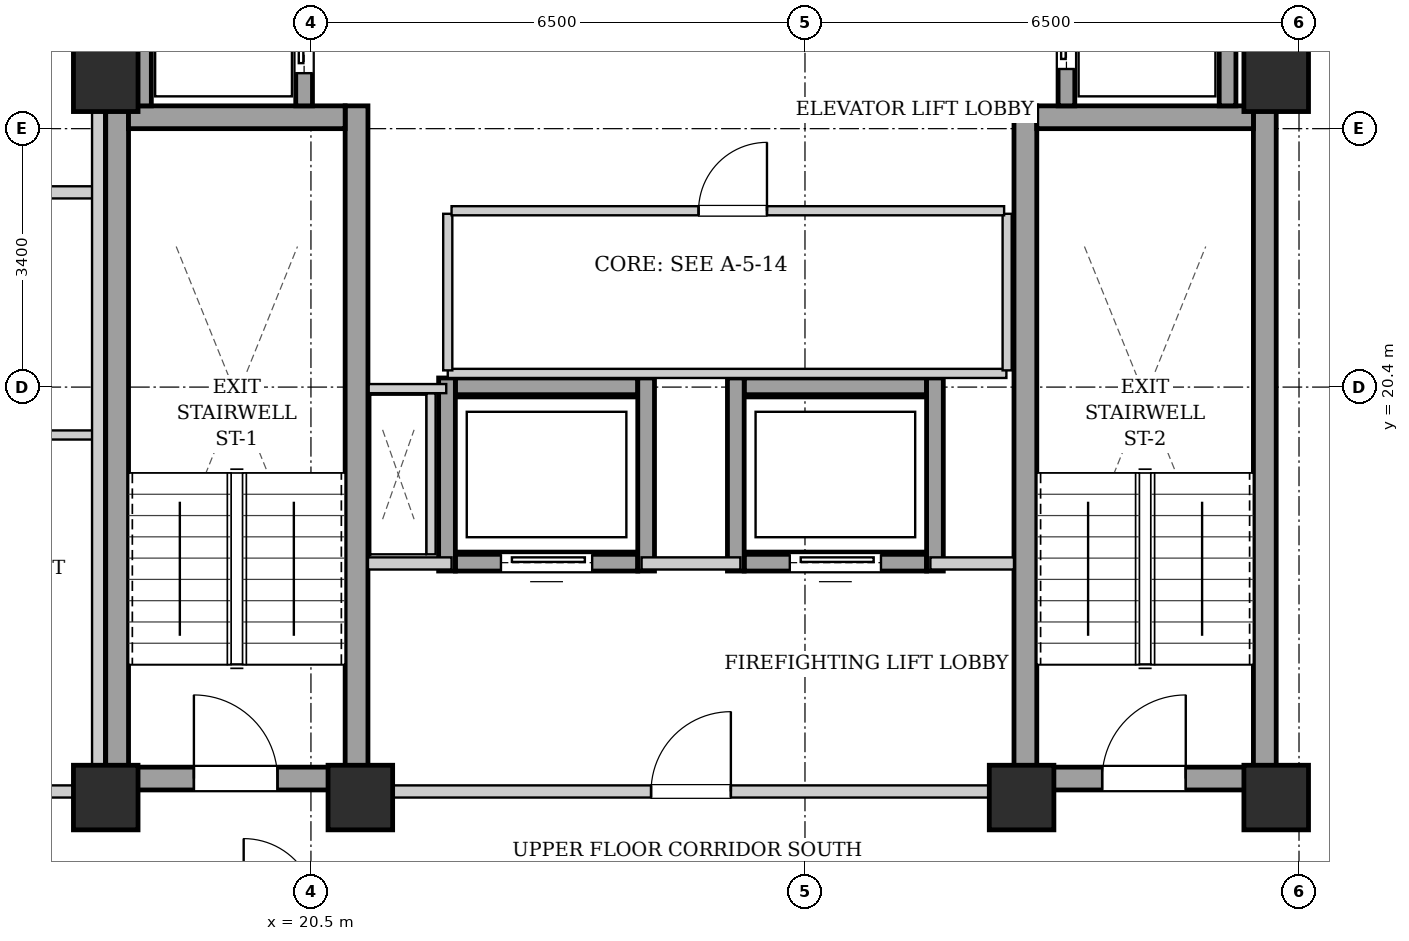
"""IFC4 building model, lengths in metres.
Left out: names, types, materials, properties, quantities, classifications, styles, units other than length and angle.
Written with IfcOpenShell. Run it as: python <this file> out.ifc"""

import sys

from ifc_helpers import new_model, si_unit, direction, frame, frame_2d, origin, origin_2d, place, context, subcontext, project, spatial, rectangle, extrude, element, fill, save


model = new_model("IFC4")
c1 = context("Model", 3, precision=1e-05, world=origin(), true_north=direction((0.0, 1.0)))
c2 = subcontext(c1, "Body", "Model", "MODEL_VIEW")
j1 = project(units=[si_unit("LENGTHUNIT", "METRE"), si_unit("PLANEANGLEUNIT", "RADIAN")], contexts=[c1])
p1 = place(None, origin())
s1 = spatial("IfcSite", under=j1, at=p1, CompositionType="ELEMENT")
p2 = place(p1, origin())
s2 = spatial("IfcBuilding", under=s1, at=p2, CompositionType="ELEMENT")
p3 = place(p2, frame((0.0, 0.0, 187.6)))
s3 = spatial("IfcBuildingStorey", under=s2, at=p3, CompositionType="ELEMENT", Elevation=187.6)
for number, where, z_axis, x_axis in (
    (1, (17.8, 15.0, 0.0), (0.0, 0.0, 1.0), (1.0, 0.0, 0.0)),
    (2, (21.15, 15.0, 0.0), (0.0, 0.0, 1.0), (1.0, 0.0, 0.0)),
    (3, (29.85, 15.0, 0.0), (0.0, 0.0, 1.0), (1.0, 0.0, 0.0)),
    (4, (33.2, 15.0, 0.0), (0.0, 0.0, 1.0), (1.0, 0.0, 0.0)),
    (5, (17.8, 24.45, 0.0), (0.0, 0.0, 1.0), (1.0, 0.0, 0.0)),
    (6, (33.2, 24.45, 0.0), (0.0, 0.0, 1.0), (1.0, 0.0, 0.0)),
):
    element("IfcColumn", number, at=place(p3, frame(where, z_axis=z_axis, x_axis=x_axis)), inside=s3, PredefinedType="COLUMN", context=c2, shape_type="SweptSolid", body=[
        extrude(rectangle(XDim=0.85, YDim=0.85, at=origin_2d()), origin(), (0.0, 0.0, 1.0), 3.3),
    ])
for number, where, z_axis, x_axis in (
    (7, (17.95, 15.1, 0.0), (0.0, 0.0, 1.0), (0.0, 1.0, 0.0)),
    (8, (21.1, 15.1, 0.0), (0.0, 0.0, 1.0), (0.0, 1.0, 0.0)),
):
    element("IfcWall", number, at=place(p3, frame(where, z_axis=z_axis, x_axis=x_axis)), inside=s3, PredefinedType="SHEAR", context=c2, shape_type="SweptSolid", body=[
        extrude(rectangle(XDim=9.0, YDim=0.3, at=frame_2d((4.5, 0.0))), origin(), (0.0, 0.0, 1.0), 3.04),
    ])
p4 = place(p3, frame((18.1, 23.95, 0.0), z_axis=(0.0, 0.0, 1.0), x_axis=(1.0, 0.0, 0.0)))
e9 = element("IfcWall", 9, at=p4, inside=s3, PredefinedType="SHEAR", context=c2, shape_type="SweptSolid", body=[
    extrude(rectangle(XDim=2.85, YDim=0.3, at=frame_2d((1.425, 0.0))), origin(), (0.0, 0.0, 1.0), 3.04),
])
p5 = place(p3, frame((18.1, 15.25, 0.0), z_axis=(0.0, 0.0, 1.0), x_axis=(1.0, 0.0, 0.0)))
e10 = element("IfcWall", 10, at=p5, inside=s3, PredefinedType="SHEAR", context=c2, shape_type="SweptSolid", body=[
    extrude(rectangle(XDim=2.85, YDim=0.3, at=frame_2d((1.425, 0.0))), origin(), (0.0, 0.0, 1.0), 3.04),
])
p6 = place(p5, frame((0.86, 0.0, 0.0)))
e11 = element("IfcOpeningElement", 11, at=p6, cuts=e10, PredefinedType="OPENING", context=c2, shape_type="SweptSolid", body=[
    extrude(rectangle(XDim=1.1, YDim=2.05, at=frame_2d((0.55, 1.025))), frame((0.0, 0.16, 0.0), z_axis=(0.0, -1.0, 0.0), x_axis=(1.0, 0.0, 0.0)), (0.0, 0.0, 1.0), 0.32),
])
for number, where, z_axis, x_axis in (
    (12, (29.9, 15.1, 0.0), (0.0, 0.0, 1.0), (0.0, 1.0, 0.0)),
    (13, (33.05, 15.1, 0.0), (0.0, 0.0, 1.0), (0.0, 1.0, 0.0)),
):
    element("IfcWall", number, at=place(p3, frame(where, z_axis=z_axis, x_axis=x_axis)), inside=s3, PredefinedType="SHEAR", context=c2, shape_type="SweptSolid", body=[
        extrude(rectangle(XDim=9.0, YDim=0.3, at=frame_2d((4.5, 0.0))), origin(), (0.0, 0.0, 1.0), 3.04),
    ])
p7 = place(p3, frame((30.05, 23.95, 0.0), z_axis=(0.0, 0.0, 1.0), x_axis=(1.0, 0.0, 0.0)))
e14 = element("IfcWall", 14, at=p7, inside=s3, PredefinedType="SHEAR", context=c2, shape_type="SweptSolid", body=[
    extrude(rectangle(XDim=2.85, YDim=0.3, at=frame_2d((1.425, 0.0))), origin(), (0.0, 0.0, 1.0), 3.04),
])
p8 = place(p3, frame((30.05, 15.25, 0.0), z_axis=(0.0, 0.0, 1.0), x_axis=(1.0, 0.0, 0.0)))
e15 = element("IfcWall", 15, at=p8, inside=s3, PredefinedType="SHEAR", context=c2, shape_type="SweptSolid", body=[
    extrude(rectangle(XDim=2.85, YDim=0.3, at=frame_2d((1.425, 0.0))), origin(), (0.0, 0.0, 1.0), 3.04),
])
p9 = place(p8, frame((0.86, 0.0, 0.0)))
e16 = element("IfcOpeningElement", 16, at=p9, cuts=e15, PredefinedType="OPENING", context=c2, shape_type="SweptSolid", body=[
    extrude(rectangle(XDim=1.1, YDim=2.05, at=frame_2d((0.55, 1.025))), frame((0.0, 0.16, 0.0), z_axis=(0.0, -1.0, 0.0), x_axis=(1.0, 0.0, 0.0)), (0.0, 0.0, 1.0), 0.32),
])
p10 = place(p3, frame((18.29, 24.1, 0.0), z_axis=(0.0, 0.0, 1.0), x_axis=(0.0, 1.0, 0.0)))
e17 = element("IfcWall", 17, at=p10, inside=s3, PredefinedType="SHEAR", context=c2, shape_type="SweptSolid", body=[
    extrude(rectangle(XDim=4.14, YDim=0.22, at=frame_2d((2.07, 0.0))), origin(), (0.0, 0.0, 1.0), 3.04),
])
p11 = place(p3, frame((20.41, 24.1, 0.0), z_axis=(0.0, 0.0, 1.0), x_axis=(0.0, 1.0, 0.0)))
e18 = element("IfcWall", 18, at=p11, inside=s3, PredefinedType="SHEAR", context=c2, shape_type="SweptSolid", body=[
    extrude(rectangle(XDim=1.96, YDim=0.22, at=frame_2d((0.98, 0.0))), origin(), (0.0, 0.0, 1.0), 3.04),
])
p12 = place(p11, frame((0.43, 0.0, 0.0)))
e19 = element("IfcOpeningElement", 19, at=p12, cuts=e18, PredefinedType="OPENING", context=c2, shape_type="SweptSolid", body=[
    extrude(rectangle(XDim=1.1, YDim=2.15, at=frame_2d((0.55, 1.075))), frame((0.0, 0.12, 0.0), z_axis=(0.0, -1.0, 0.0), x_axis=(1.0, 0.0, 0.0)), (0.0, 0.0, 1.0), 0.24),
])
p13 = place(p3, frame((30.44, 24.1, 0.0), z_axis=(0.0, 0.0, 1.0), x_axis=(0.0, 1.0, 0.0)))
e20 = element("IfcWall", 20, at=p13, inside=s3, PredefinedType="SHEAR", context=c2, shape_type="SweptSolid", body=[
    extrude(rectangle(XDim=2.07, YDim=0.22, at=frame_2d((1.035, 0.0))), origin(), (0.0, 0.0, 1.0), 3.04),
])
p14 = place(p13, frame((0.485, 0.0, 0.0)))
e21 = element("IfcOpeningElement", 21, at=p14, cuts=e20, PredefinedType="OPENING", context=c2, shape_type="SweptSolid", body=[
    extrude(rectangle(XDim=1.1, YDim=2.15, at=frame_2d((0.55, 1.075))), frame((0.0, 0.12, 0.0), z_axis=(0.0, -1.0, 0.0), x_axis=(1.0, 0.0, 0.0)), (0.0, 0.0, 1.0), 0.24),
])
p15 = place(p3, frame((32.56, 24.1, 0.0), z_axis=(0.0, 0.0, 1.0), x_axis=(0.0, 1.0, 0.0)))
e22 = element("IfcWall", 22, at=p15, inside=s3, PredefinedType="SHEAR", context=c2, shape_type="SweptSolid", body=[
    extrude(rectangle(XDim=2.07, YDim=0.22, at=frame_2d((1.035, 0.0))), origin(), (0.0, 0.0, 1.0), 3.04),
])
p16 = place(p3, frame((22.4, 18.09, 0.0), z_axis=(0.0, 0.0, 1.0), x_axis=(1.0, 0.0, 0.0)))
e23 = element("IfcWall", 23, at=p16, inside=s3, PredefinedType="SHEAR", context=c2, shape_type="SweptSolid", body=[
    extrude(rectangle(XDim=2.4, YDim=0.22, at=frame_2d((1.2, 0.0))), origin(), (0.0, 0.0, 1.0), 3.04),
])
p17 = place(p16, frame((0.6, 0.0, 0.0)))
e24 = element("IfcOpeningElement", 24, at=p17, cuts=e23, PredefinedType="OPENING", context=c2, shape_type="SweptSolid", body=[
    extrude(rectangle(XDim=1.2, YDim=2.15, at=frame_2d((0.6, 1.075))), frame((0.0, 0.12, 0.0), z_axis=(0.0, -1.0, 0.0), x_axis=(1.0, 0.0, 0.0)), (0.0, 0.0, 1.0), 0.24),
])
p18 = place(p3, frame((22.4, 20.41, 0.0), z_axis=(0.0, 0.0, 1.0), x_axis=(1.0, 0.0, 0.0)))
e25 = element("IfcWall", 25, at=p18, inside=s3, PredefinedType="SHEAR", context=c2, shape_type="SweptSolid", body=[
    extrude(rectangle(XDim=2.4, YDim=0.22, at=frame_2d((1.2, 0.0))), origin(), (0.0, 0.0, 1.0), 3.04),
])
for number, where, z_axis, x_axis in (
    (26, (22.29, 17.98, 0.0), (0.0, 0.0, 1.0), (0.0, 1.0, 0.0)),
    (27, (24.91, 17.98, 0.0), (0.0, 0.0, 1.0), (0.0, 1.0, 0.0)),
):
    element("IfcWall", number, at=place(p3, frame(where, z_axis=z_axis, x_axis=x_axis)), inside=s3, PredefinedType="SHEAR", context=c2, shape_type="SweptSolid", body=[
        extrude(rectangle(XDim=2.54, YDim=0.22, at=frame_2d((1.27, 0.0))), origin(), (0.0, 0.0, 1.0), 3.04),
    ])
p19 = place(p3, frame((26.2, 18.09, 0.0), z_axis=(0.0, 0.0, 1.0), x_axis=(1.0, 0.0, 0.0)))
e28 = element("IfcWall", 28, at=p19, inside=s3, PredefinedType="SHEAR", context=c2, shape_type="SweptSolid", body=[
    extrude(rectangle(XDim=2.4, YDim=0.22, at=frame_2d((1.2, 0.0))), origin(), (0.0, 0.0, 1.0), 3.04),
])
p20 = place(p19, frame((0.6, 0.0, 0.0)))
e29 = element("IfcOpeningElement", 29, at=p20, cuts=e28, PredefinedType="OPENING", context=c2, shape_type="SweptSolid", body=[
    extrude(rectangle(XDim=1.2, YDim=2.15, at=frame_2d((0.6, 1.075))), frame((0.0, 0.12, 0.0), z_axis=(0.0, -1.0, 0.0), x_axis=(1.0, 0.0, 0.0)), (0.0, 0.0, 1.0), 0.24),
])
p21 = place(p3, frame((26.2, 20.41, 0.0), z_axis=(0.0, 0.0, 1.0), x_axis=(1.0, 0.0, 0.0)))
e30 = element("IfcWall", 30, at=p21, inside=s3, PredefinedType="SHEAR", context=c2, shape_type="SweptSolid", body=[
    extrude(rectangle(XDim=2.4, YDim=0.22, at=frame_2d((1.2, 0.0))), origin(), (0.0, 0.0, 1.0), 3.04),
])
for number, where, z_axis, x_axis in (
    (31, (26.09, 17.98, 0.0), (0.0, 0.0, 1.0), (0.0, 1.0, 0.0)),
    (32, (28.71, 17.98, 0.0), (0.0, 0.0, 1.0), (0.0, 1.0, 0.0)),
):
    element("IfcWall", number, at=place(p3, frame(where, z_axis=z_axis, x_axis=x_axis)), inside=s3, PredefinedType="SHEAR", context=c2, shape_type="SweptSolid", body=[
        extrude(rectangle(XDim=2.54, YDim=0.22, at=frame_2d((1.27, 0.0))), origin(), (0.0, 0.0, 1.0), 3.04),
    ])
p22 = place(p3, frame((21.25, 15.08, 0.0), z_axis=(0.0, 0.0, 1.0), x_axis=(1.0, 0.0, 0.0)))
e33 = element("IfcWall", 33, at=p22, inside=s3, PredefinedType="PARTITIONING", context=c2, shape_type="SweptSolid", body=[
    extrude(rectangle(XDim=8.5, YDim=0.16, at=frame_2d((4.25, 0.0))), origin(), (0.0, 0.0, 1.0), 2.556),
])
p23 = place(p22, frame((3.725, 0.0, 0.0)))
e34 = element("IfcOpeningElement", 34, at=p23, cuts=e33, PredefinedType="OPENING", context=c2, shape_type="SweptSolid", body=[
    extrude(rectangle(XDim=1.05, YDim=2.05, at=frame_2d((0.525, 1.025))), frame((0.0, 0.09, 0.0), z_axis=(0.0, -1.0, 0.0), x_axis=(1.0, 0.0, 0.0)), (0.0, 0.0, 1.0), 0.18),
])
p24 = place(p3, frame((21.25, 18.08, 0.0), z_axis=(0.0, 0.0, 1.0), x_axis=(1.0, 0.0, 0.0)))
e35 = element("IfcWall", 35, at=p24, inside=s3, PredefinedType="PARTITIONING", context=c2, shape_type="SweptSolid", body=[
    extrude(rectangle(XDim=1.1, YDim=0.16, at=frame_2d((0.55, 0.0))), origin(), (0.0, 0.0, 1.0), 3.04),
])
p25 = place(p3, frame((24.85, 18.08, 0.0), z_axis=(0.0, 0.0, 1.0), x_axis=(1.0, 0.0, 0.0)))
e36 = element("IfcWall", 36, at=p25, inside=s3, PredefinedType="PARTITIONING", context=c2, shape_type="SweptSolid", body=[
    extrude(rectangle(XDim=1.3, YDim=0.16, at=frame_2d((0.65, 0.0))), origin(), (0.0, 0.0, 1.0), 3.04),
])
p26 = place(p3, frame((28.65, 18.08, 0.0), z_axis=(0.0, 0.0, 1.0), x_axis=(1.0, 0.0, 0.0)))
e37 = element("IfcWall", 37, at=p26, inside=s3, PredefinedType="PARTITIONING", context=c2, shape_type="SweptSolid", body=[
    extrude(rectangle(XDim=1.1, YDim=0.16, at=frame_2d((0.55, 0.0))), origin(), (0.0, 0.0, 1.0), 3.04),
])
for number, where, z_axis, x_axis in (
    (38, (17.88, 24.12, 0.0), (0.0, 0.0, 1.0), (0.0, 1.0, 0.0)),
    (39, (33.12, 24.12, 0.0), (0.0, 0.0, 1.0), (0.0, 1.0, 0.0)),
):
    element("IfcWall", number, at=place(p3, frame(where, z_axis=z_axis, x_axis=x_axis)), inside=s3, PredefinedType="PARTITIONING", context=c2, shape_type="SweptSolid", body=[
        extrude(rectangle(XDim=4.76, YDim=0.16, at=frame_2d((2.38, 0.0))), origin(), (0.0, 0.0, 1.0), 2.375),
    ])
p27 = place(p3, frame((22.08, 18.2, 0.0), z_axis=(0.0, 0.0, 1.0), x_axis=(0.0, 1.0, 0.0)))
e40 = element("IfcWall", 40, at=p27, inside=s3, PredefinedType="PARTITIONING", context=c2, shape_type="SweptSolid", body=[
    extrude(rectangle(XDim=2.12, YDim=0.12, at=frame_2d((1.06, 0.0))), origin(), (0.0, 0.0, 1.0), 3.04),
])
p28 = place(p3, frame((22.28, 20.38, 0.0), z_axis=(0.0, 0.0, 1.0), x_axis=(-1.0, 0.0, 0.0)))
e41 = element("IfcWall", 41, at=p28, inside=s3, PredefinedType="PARTITIONING", context=c2, shape_type="SweptSolid", body=[
    extrude(rectangle(XDim=1.02, YDim=0.12, at=frame_2d((0.51, 0.0))), origin(), (0.0, 0.0, 1.0), 3.04),
])
p29 = place(p3, frame((22.3, 20.58, 0.0), z_axis=(0.0, 0.0, 1.0), x_axis=(1.0, 0.0, 0.0)))
e42 = element("IfcWall", 42, at=p29, inside=s3, PredefinedType="PARTITIONING", context=c2, shape_type="SweptSolid", body=[
    extrude(rectangle(XDim=7.35, YDim=0.12, at=frame_2d((3.675, 0.0))), origin(), (0.0, 0.0, 1.0), 3.04),
])
for number, where, z_axis, x_axis in (
    (43, (22.3, 20.62, 0.0), (0.0, 0.0, 1.0), (0.0, 1.0, 0.0)),
    (44, (29.66, 20.62, 0.0), (0.0, 0.0, 1.0), (0.0, 1.0, 0.0)),
):
    element("IfcWall", number, at=place(p3, frame(where, z_axis=z_axis, x_axis=x_axis)), inside=s3, PredefinedType="PARTITIONING", context=c2, shape_type="SweptSolid", body=[
        extrude(rectangle(XDim=2.06, YDim=0.12, at=frame_2d((1.03, 0.0))), origin(), (0.0, 0.0, 1.0), 3.04),
    ])
p30 = place(p3, frame((22.35, 22.72, 0.0), z_axis=(0.0, 0.0, 1.0), x_axis=(1.0, 0.0, 0.0)))
e45 = element("IfcWall", 45, at=p30, inside=s3, PredefinedType="PARTITIONING", context=c2, shape_type="SweptSolid", body=[
    extrude(rectangle(XDim=7.27, YDim=0.12, at=frame_2d((3.635, 0.0))), origin(), (0.0, 0.0, 1.0), 3.04),
])
p31 = place(p30, frame((3.25, 0.0, 0.0)))
e46 = element("IfcOpeningElement", 46, at=p31, cuts=e45, PredefinedType="OPENING", context=c2, shape_type="SweptSolid", body=[
    extrude(rectangle(XDim=0.9, YDim=2.05, at=frame_2d((0.45, 1.025))), frame((0.0, 0.07, 0.0), z_axis=(0.0, -1.0, 0.0), x_axis=(1.0, 0.0, 0.0)), (0.0, 0.0, 1.0), 0.14),
])
p32 = place(p3, frame((10.88, 15.08, 0.0), z_axis=(0.0, 0.0, 1.0), x_axis=(1.0, 0.0, 0.0)))
e47 = element("IfcWall", 47, at=p32, inside=s3, PredefinedType="PARTITIONING", context=c2, shape_type="SweptSolid", body=[
    extrude(rectangle(XDim=6.88, YDim=0.16, at=frame_2d((3.44, 0.0))), origin(), (0.0, 0.0, 1.0), 2.556),
])
p33 = place(p32, frame((5.06, 0.0, 0.0)))
e48 = element("IfcOpeningElement", 48, at=p33, cuts=e47, PredefinedType="OPENING", context=c2, shape_type="SweptSolid", body=[
    extrude(rectangle(XDim=0.95, YDim=2.1, at=frame_2d((0.475, 1.05))), frame((0.0, 0.09, 0.0), z_axis=(0.0, -1.0, 0.0), x_axis=(1.0, 0.0, 0.0)), (0.0, 0.0, 1.0), 0.18),
])
p34 = place(p3, frame((10.88, 22.962, 0.0), z_axis=(0.0, 0.0, 1.0), x_axis=(1.0, 0.0, 0.0)))
e49 = element("IfcWall", 49, at=p34, inside=s3, PredefinedType="PARTITIONING", context=c2, shape_type="SweptSolid", body=[
    extrude(rectangle(XDim=6.76, YDim=0.16, at=frame_2d((3.38, 0.0))), origin(), (0.0, 0.0, 1.0), 3.04),
])
p35 = place(p3, frame((15.19, 19.77, 0.0), z_axis=(0.0, 0.0, 1.0), x_axis=(1.0, 0.0, 0.0)))
e50 = element("IfcWall", 50, at=p35, inside=s3, PredefinedType="PARTITIONING", context=c2, shape_type="SweptSolid", body=[
    extrude(rectangle(XDim=2.45, YDim=0.12, at=frame_2d((1.225, 0.0))), origin(), (0.0, 0.0, 1.0), 3.04),
])
p36 = place(p35, frame((0.795, 0.0, 0.0)))
e51 = element("IfcOpeningElement", 51, at=p36, cuts=e50, PredefinedType="OPENING", context=c2, shape_type="SweptSolid", body=[
    extrude(rectangle(XDim=0.86, YDim=2.05, at=frame_2d((0.43, 1.025))), frame((0.0, 0.07, 0.0), z_axis=(0.0, -1.0, 0.0), x_axis=(1.0, 0.0, 0.0)), (0.0, 0.0, 1.0), 0.14),
])
p37 = place(p3, frame((17.7, 15.02, 0.0), z_axis=(0.0, 0.0, 1.0), x_axis=(0.0, 1.0, 0.0)))
e52 = element("IfcWall", 52, at=p37, inside=s3, PredefinedType="PARTITIONING", context=c2, shape_type="SweptSolid", body=[
    extrude(rectangle(XDim=13.98, YDim=0.16, at=frame_2d((6.99, 0.0))), origin(), (0.0, 0.0, 1.0), 2.375),
])
p38 = place(p6, origin())
e53 = element("IfcDoor", 53, at=p38, inside=s3, OperationType="SINGLE_SWING_LEFT", PredefinedType="DOOR", context=c2, shape_type="SweptSolid", body=[
    extrude(rectangle(XDim=1.1, YDim=2.05, at=frame_2d((0.55, 1.025))), frame((0.0, 0.025, 0.0), z_axis=(0.0, -1.0, 0.0), x_axis=(1.0, 0.0, 0.0)), (0.0, 0.0, 1.0), 0.05),
])
fill(e11, e53)
p39 = place(p9, origin())
e54 = element("IfcDoor", 54, at=p39, inside=s3, OperationType="SINGLE_SWING_RIGHT", PredefinedType="DOOR", context=c2, shape_type="SweptSolid", body=[
    extrude(rectangle(XDim=1.1, YDim=2.05, at=frame_2d((0.55, 1.025))), frame((0.0, 0.025, 0.0), z_axis=(0.0, -1.0, 0.0), x_axis=(1.0, 0.0, 0.0)), (0.0, 0.0, 1.0), 0.05),
])
fill(e16, e54)
p40 = place(p12, origin())
e55 = element("IfcDoor", 55, at=p40, inside=s3, OperationType="SLIDING_TO_LEFT", PredefinedType="DOOR", context=c2, shape_type="SweptSolid", body=[
    extrude(rectangle(XDim=1.1, YDim=2.15, at=frame_2d((0.55, 1.075))), frame((0.0, 0.025, 0.0), z_axis=(0.0, -1.0, 0.0), x_axis=(1.0, 0.0, 0.0)), (0.0, 0.0, 1.0), 0.05),
])
fill(e19, e55)
p41 = place(p14, origin())
e56 = element("IfcDoor", 56, at=p41, inside=s3, OperationType="SLIDING_TO_LEFT", PredefinedType="DOOR", context=c2, shape_type="SweptSolid", body=[
    extrude(rectangle(XDim=1.1, YDim=2.15, at=frame_2d((0.55, 1.075))), frame((0.0, 0.025, 0.0), z_axis=(0.0, -1.0, 0.0), x_axis=(1.0, 0.0, 0.0)), (0.0, 0.0, 1.0), 0.05),
])
fill(e21, e56)
p42 = place(p17, origin())
e57 = element("IfcDoor", 57, at=p42, inside=s3, OperationType="SLIDING_TO_LEFT", PredefinedType="DOOR", context=c2, shape_type="SweptSolid", body=[
    extrude(rectangle(XDim=1.2, YDim=2.15, at=frame_2d((0.6, 1.075))), frame((0.0, 0.025, 0.0), z_axis=(0.0, -1.0, 0.0), x_axis=(1.0, 0.0, 0.0)), (0.0, 0.0, 1.0), 0.05),
])
fill(e24, e57)
p43 = place(p20, origin())
e58 = element("IfcDoor", 58, at=p43, inside=s3, OperationType="SLIDING_TO_LEFT", PredefinedType="DOOR", context=c2, shape_type="SweptSolid", body=[
    extrude(rectangle(XDim=1.2, YDim=2.15, at=frame_2d((0.6, 1.075))), frame((0.0, 0.025, 0.0), z_axis=(0.0, -1.0, 0.0), x_axis=(1.0, 0.0, 0.0)), (0.0, 0.0, 1.0), 0.05),
])
fill(e29, e58)
p44 = place(p23, origin())
e59 = element("IfcDoor", 59, at=p44, inside=s3, OperationType="SINGLE_SWING_RIGHT", PredefinedType="DOOR", context=c2, shape_type="SweptSolid", body=[
    extrude(rectangle(XDim=1.05, YDim=2.05, at=frame_2d((0.525, 1.025))), frame((0.0, 0.025, 0.0), z_axis=(0.0, -1.0, 0.0), x_axis=(1.0, 0.0, 0.0)), (0.0, 0.0, 1.0), 0.05),
])
fill(e34, e59)
p45 = place(p31, origin())
e60 = element("IfcDoor", 60, at=p45, inside=s3, OperationType="SINGLE_SWING_RIGHT", PredefinedType="DOOR", context=c2, shape_type="SweptSolid", body=[
    extrude(rectangle(XDim=0.9, YDim=2.05, at=frame_2d((0.45, 1.025))), frame((0.0, 0.025, 0.0), z_axis=(0.0, -1.0, 0.0), x_axis=(1.0, 0.0, 0.0)), (0.0, 0.0, 1.0), 0.05),
])
fill(e46, e60)
save(model, sys.argv[1])
